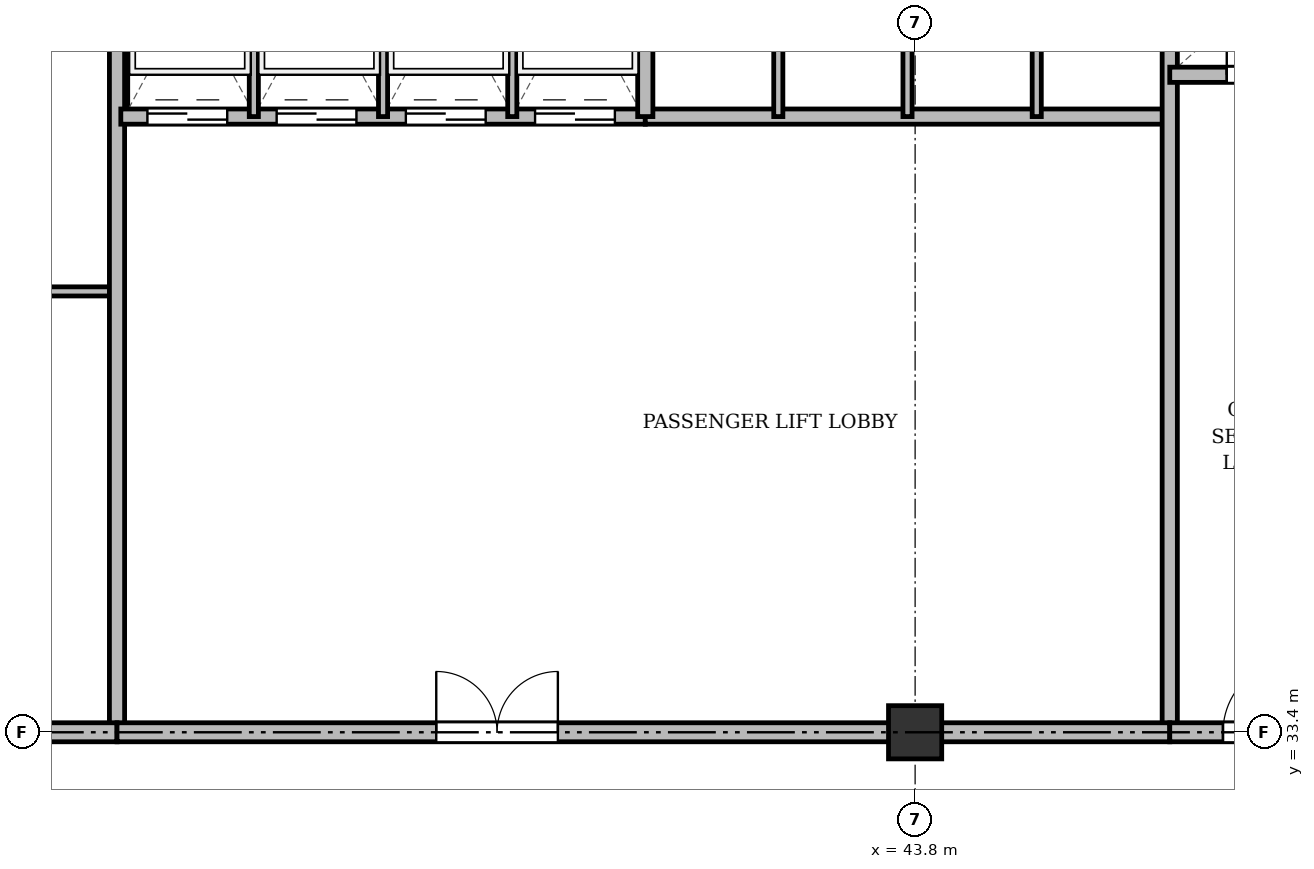
"""IFC4 building model, lengths in metres.
Left out: names, types, materials, properties, quantities, classifications, styles, units other than length and angle.
Written with IfcOpenShell. Run it as: python <this file> out.ifc"""

import sys

from ifc_helpers import new_model, si_unit, direction, frame, frame_2d, origin, origin_2d, place, context, subcontext, project, spatial, rectangle, extrude, source, transform, mapped, element, fill, save


model = new_model("IFC4")
c1 = context("Model", 3, precision=1e-05, world=origin(), true_north=direction((0.0, 1.0)))
c2 = subcontext(c1, "Body", "Model", "MODEL_VIEW")
j1 = project(units=[si_unit("LENGTHUNIT", "METRE"), si_unit("PLANEANGLEUNIT", "RADIAN")], contexts=[c1])
p1 = place(None, origin())
s1 = spatial("IfcSite", under=j1, at=p1, CompositionType="ELEMENT")
p2 = place(p1, origin())
s2 = spatial("IfcBuilding", under=s1, at=p2, CompositionType="ELEMENT")
p3 = place(p2, frame((0.0, 0.0, 182.5)))
s3 = spatial("IfcBuildingStorey", under=s2, at=p3, CompositionType="ELEMENT", Elevation=182.5)
m1 = source(origin(), c2, "Body", "SweptSolid", [
    extrude(rectangle(XDim=0.7, YDim=0.7, at=origin_2d()), origin(), (0.0, 0.0, 1.0), 8.0),
])
p4 = place(p3, frame((43.8, 33.4, 0.0), z_axis=(0.0, 0.0, 1.0), x_axis=(1.0, 0.0, 0.0)))
e1 = element("IfcColumn", 1, at=p4, inside=s3, PredefinedType="COLUMN", context=c2, shape_type="MappedRepresentation", body=[
    mapped(m1, transform((0.0, 0.0, 0.0), x_axis=(1.0, 0.0, 0.0), y_axis=(0.0, 1.0, 0.0), z_axis=(0.0, 0.0, 1.0), scale=1.0)),
])
p5 = place(p3, frame((26.3, 39.2, 0.0), z_axis=(0.0, 0.0, 1.0), x_axis=(1.0, 0.0, 0.0)))
e2 = element("IfcWall", 2, at=p5, inside=s3, PredefinedType="PARTITIONING", context=c2, shape_type="SweptSolid", body=[
    extrude(rectangle(XDim=7.0, YDim=0.12, at=frame_2d((3.5, 0.0))), origin(), (0.0, 0.0, 1.0), 7.12),
])
p6 = place(p5, frame((2.6, 0.0, 0.0)))
e3 = element("IfcOpeningElement", 3, at=p6, cuts=e2, PredefinedType="OPENING", context=c2, shape_type="SweptSolid", body=[
    extrude(rectangle(XDim=0.95, YDim=2.15, at=frame_2d((0.475, 1.075))), frame((0.0, 0.07, 0.0), z_axis=(0.0, -1.0, 0.0), x_axis=(1.0, 0.0, 0.0)), (0.0, 0.0, 1.0), 0.14),
])
p7 = place(p3, frame((33.3, 33.4, 0.0), z_axis=(0.0, 0.0, 1.0), x_axis=(0.0, 1.0, 0.0)))
e4 = element("IfcWall", 4, at=p7, inside=s3, PredefinedType="SOLIDWALL", context=c2, shape_type="SweptSolid", body=[
    extrude(rectangle(XDim=11.3, YDim=0.2, at=frame_2d((5.65, 0.0))), origin(), (0.0, 0.0, 1.0), 7.02),
])
p8 = place(p3, frame((33.35, 41.5, 0.0), z_axis=(0.0, 0.0, 1.0), x_axis=(1.0, 0.0, 0.0)))
e5 = element("IfcWall", 5, at=p8, inside=s3, PredefinedType="SOLIDWALL", context=c2, shape_type="SweptSolid", body=[
    extrude(rectangle(XDim=6.9, YDim=0.2, at=frame_2d((3.45, 0.0))), origin(), (0.0, 0.0, 1.0), 7.62),
])
p9 = place(p8, frame((0.35, 0.0, 0.0)))
e6 = element("IfcOpeningElement", 6, at=p9, cuts=e5, PredefinedType="OPENING", context=c2, shape_type="SweptSolid", body=[
    extrude(rectangle(XDim=1.05, YDim=2.15, at=frame_2d((0.525, 1.075))), frame((0.0, 0.11, 0.0), z_axis=(0.0, -1.0, 0.0), x_axis=(1.0, 0.0, 0.0)), (0.0, 0.0, 1.0), 0.22),
])
p10 = place(p8, frame((2.05, 0.0, 0.0)))
e7 = element("IfcOpeningElement", 7, at=p10, cuts=e5, PredefinedType="OPENING", context=c2, shape_type="SweptSolid", body=[
    extrude(rectangle(XDim=1.05, YDim=2.15, at=frame_2d((0.525, 1.075))), frame((0.0, 0.11, 0.0), z_axis=(0.0, -1.0, 0.0), x_axis=(1.0, 0.0, 0.0)), (0.0, 0.0, 1.0), 0.22),
])
p11 = place(p8, frame((3.75, 0.0, 0.0)))
e8 = element("IfcOpeningElement", 8, at=p11, cuts=e5, PredefinedType="OPENING", context=c2, shape_type="SweptSolid", body=[
    extrude(rectangle(XDim=1.05, YDim=2.15, at=frame_2d((0.525, 1.075))), frame((0.0, 0.11, 0.0), z_axis=(0.0, -1.0, 0.0), x_axis=(1.0, 0.0, 0.0)), (0.0, 0.0, 1.0), 0.22),
])
p12 = place(p8, frame((5.45, 0.0, 0.0)))
e9 = element("IfcOpeningElement", 9, at=p12, cuts=e5, PredefinedType="OPENING", context=c2, shape_type="SweptSolid", body=[
    extrude(rectangle(XDim=1.05, YDim=2.15, at=frame_2d((0.525, 1.075))), frame((0.0, 0.11, 0.0), z_axis=(0.0, -1.0, 0.0), x_axis=(1.0, 0.0, 0.0)), (0.0, 0.0, 1.0), 0.22),
])
for number, where, z_axis, x_axis in (
    (10, (35.1, 41.5, 0.0), (0.0, 0.0, 1.0), (0.0, 1.0, 0.0)),
    (11, (36.8, 41.5, 0.0), (0.0, 0.0, 1.0), (0.0, 1.0, 0.0)),
    (12, (38.5, 41.5, 0.0), (0.0, 0.0, 1.0), (0.0, 1.0, 0.0)),
):
    element("IfcWall", number, at=place(p3, frame(where, z_axis=z_axis, x_axis=x_axis)), inside=s3, PredefinedType="PARTITIONING", context=c2, shape_type="SweptSolid", body=[
        extrude(rectangle(XDim=3.2, YDim=0.12, at=frame_2d((1.6, 0.0))), origin(), (0.0, 0.0, 1.0), 7.62),
    ])
p13 = place(p3, frame((40.25, 41.5, 0.0), z_axis=(0.0, 0.0, 1.0), x_axis=(1.0, 0.0, 0.0)))
e13 = element("IfcWall", 13, at=p13, inside=s3, PredefinedType="SOLIDWALL", context=c2, shape_type="SweptSolid", body=[
    extrude(rectangle(XDim=6.9, YDim=0.2, at=frame_2d((3.45, 0.0))), origin(), (0.0, 0.0, 1.0), 7.12),
])
p14 = place(p3, frame((40.25, 41.5, 0.0), z_axis=(0.0, 0.0, 1.0), x_axis=(0.0, 1.0, 0.0)))
e14 = element("IfcWall", 14, at=p14, inside=s3, PredefinedType="SOLIDWALL", context=c2, shape_type="SweptSolid", body=[
    extrude(rectangle(XDim=3.2, YDim=0.2, at=frame_2d((1.6, 0.0))), origin(), (0.0, 0.0, 1.0), 7.62),
])
p15 = place(p3, frame((42.0, 41.5, 0.0), z_axis=(0.0, 0.0, 1.0), x_axis=(0.0, 1.0, 0.0)))
e15 = element("IfcWall", 15, at=p15, inside=s3, PredefinedType="PARTITIONING", context=c2, shape_type="SweptSolid", body=[
    extrude(rectangle(XDim=3.2, YDim=0.12, at=frame_2d((1.6, 0.0))), origin(), (0.0, 0.0, 1.0), 7.62),
])
p16 = place(p3, frame((43.7, 41.5, 0.0), z_axis=(0.0, 0.0, 1.0), x_axis=(0.0, 1.0, 0.0)))
e16 = element("IfcWall", 16, at=p16, inside=s3, PredefinedType="PARTITIONING", context=c2, shape_type="SweptSolid", body=[
    extrude(rectangle(XDim=3.2, YDim=0.12, at=frame_2d((1.6, 0.0))), origin(), (0.0, 0.0, 1.0), 7.12),
])
p17 = place(p3, frame((45.4, 41.5, 0.0), z_axis=(0.0, 0.0, 1.0), x_axis=(0.0, 1.0, 0.0)))
e17 = element("IfcWall", 17, at=p17, inside=s3, PredefinedType="PARTITIONING", context=c2, shape_type="SweptSolid", body=[
    extrude(rectangle(XDim=3.2, YDim=0.12, at=frame_2d((1.6, 0.0))), origin(), (0.0, 0.0, 1.0), 7.62),
])
p18 = place(p3, frame((47.15, 33.4, 0.0), z_axis=(0.0, 0.0, 1.0), x_axis=(0.0, 1.0, 0.0)))
e18 = element("IfcWall", 18, at=p18, inside=s3, PredefinedType="SOLIDWALL", context=c2, shape_type="SweptSolid", body=[
    extrude(rectangle(XDim=11.3, YDim=0.2, at=frame_2d((5.65, 0.0))), origin(), (0.0, 0.0, 1.0), 7.02),
])
p19 = place(p3, frame((26.3, 33.4, 0.0), z_axis=(0.0, 0.0, 1.0), x_axis=(1.0, 0.0, 0.0)))
e19 = element("IfcWall", 19, at=p19, inside=s3, PredefinedType="PARTITIONING", context=c2, shape_type="SweptSolid", body=[
    extrude(rectangle(XDim=7.0, YDim=0.25, at=frame_2d((3.5, 0.0))), origin(), (0.0, 0.0, 1.0), 7.02),
])
p20 = place(p19, frame((1.35, 0.0, 0.0)))
e20 = element("IfcOpeningElement", 20, at=p20, cuts=e19, PredefinedType="OPENING", context=c2, shape_type="SweptSolid", body=[
    extrude(rectangle(XDim=0.95, YDim=2.15, at=frame_2d((0.475, 1.075))), frame((0.0, 0.135, 0.0), z_axis=(0.0, -1.0, 0.0), x_axis=(1.0, 0.0, 0.0)), (0.0, 0.0, 1.0), 0.27),
])
p21 = place(p3, frame((33.3, 33.4, 0.0), z_axis=(0.0, 0.0, 1.0), x_axis=(1.0, 0.0, 0.0)))
e21 = element("IfcWall", 21, at=p21, inside=s3, PredefinedType="PARTITIONING", context=c2, shape_type="SweptSolid", body=[
    extrude(rectangle(XDim=13.85, YDim=0.25, at=frame_2d((6.925, 0.0))), origin(), (0.0, 0.0, 1.0), 7.02),
])
p22 = place(p21, frame((4.2, 0.0, 0.0)))
e22 = element("IfcOpeningElement", 22, at=p22, cuts=e21, PredefinedType="OPENING", context=c2, shape_type="SweptSolid", body=[
    extrude(rectangle(XDim=1.6, YDim=2.2, at=frame_2d((0.8, 1.1))), frame((0.0, 0.135, 0.0), z_axis=(0.0, -1.0, 0.0), x_axis=(1.0, 0.0, 0.0)), (0.0, 0.0, 1.0), 0.27),
])
p23 = place(p3, frame((47.15, 42.05, 0.0), z_axis=(0.0, 0.0, 1.0), x_axis=(1.0, 0.0, 0.0)))
e23 = element("IfcWall", 23, at=p23, inside=s3, PredefinedType="SOLIDWALL", context=c2, shape_type="SweptSolid", body=[
    extrude(rectangle(XDim=7.85, YDim=0.2, at=frame_2d((3.925, 0.0))), origin(), (0.0, 0.0, 1.0), 7.12),
])
p24 = place(p23, frame((0.75, 0.0, 0.0)))
e24 = element("IfcOpeningElement", 24, at=p24, cuts=e23, PredefinedType="OPENING", context=c2, shape_type="SweptSolid", body=[
    extrude(rectangle(XDim=0.9, YDim=2.1, at=frame_2d((0.45, 1.05))), frame((0.0, 0.11, 0.0), z_axis=(0.0, -1.0, 0.0), x_axis=(1.0, 0.0, 0.0)), (0.0, 0.0, 1.0), 0.22),
])
p25 = place(p23, frame((3.85, 0.0, 0.0)))
e25 = element("IfcOpeningElement", 25, at=p25, cuts=e23, PredefinedType="OPENING", context=c2, shape_type="SweptSolid", body=[
    extrude(rectangle(XDim=0.9, YDim=2.1, at=frame_2d((0.45, 1.05))), frame((0.0, 0.11, 0.0), z_axis=(0.0, -1.0, 0.0), x_axis=(1.0, 0.0, 0.0)), (0.0, 0.0, 1.0), 0.22),
])
p26 = place(p3, frame((47.15, 33.4, 0.0), z_axis=(0.0, 0.0, 1.0), x_axis=(1.0, 0.0, 0.0)))
e26 = element("IfcWall", 26, at=p26, inside=s3, PredefinedType="PARTITIONING", context=c2, shape_type="SweptSolid", body=[
    extrude(rectangle(XDim=11.15, YDim=0.25, at=frame_2d((5.575, 0.0))), origin(), (0.0, 0.0, 1.0), 7.02),
])
p27 = place(p26, frame((0.7, 0.0, 0.0)))
e27 = element("IfcOpeningElement", 27, at=p27, cuts=e26, PredefinedType="OPENING", context=c2, shape_type="SweptSolid", body=[
    extrude(rectangle(XDim=0.95, YDim=2.15, at=frame_2d((0.475, 1.075))), frame((0.0, 0.135, 0.0), z_axis=(0.0, -1.0, 0.0), x_axis=(1.0, 0.0, 0.0)), (0.0, 0.0, 1.0), 0.27),
])
p28 = place(p26, frame((6.0, 0.0, 0.0)))
e28 = element("IfcOpeningElement", 28, at=p28, cuts=e26, PredefinedType="OPENING", context=c2, shape_type="SweptSolid", body=[
    extrude(rectangle(XDim=1.2, YDim=2.15, at=frame_2d((0.6, 1.075))), frame((0.0, 0.135, 0.0), z_axis=(0.0, -1.0, 0.0), x_axis=(1.0, 0.0, 0.0)), (0.0, 0.0, 1.0), 0.27),
])
m2 = source(origin(), c2, "Body", "SweptSolid", [
    extrude(rectangle(XDim=1.05, YDim=2.15, at=frame_2d((0.525, 1.075))), frame((0.0, 0.025, 0.0), z_axis=(0.0, -1.0, 0.0), x_axis=(1.0, 0.0, 0.0)), (0.0, 0.0, 1.0), 0.05),
])
p29 = place(p9, origin())
e29 = element("IfcDoor", 29, at=p29, inside=s3, OperationType="DOUBLE_DOOR_SLIDING", PredefinedType="DOOR", context=c2, shape_type="MappedRepresentation", body=[
    mapped(m2, transform((0.0, 0.0, 0.0), x_axis=(1.0, 0.0, 0.0), y_axis=(0.0, 1.0, 0.0), z_axis=(0.0, 0.0, 1.0), scale=1.0)),
])
fill(e6, e29)
p30 = place(p10, origin())
e30 = element("IfcDoor", 30, at=p30, inside=s3, OperationType="DOUBLE_DOOR_SLIDING", PredefinedType="DOOR", context=c2, shape_type="MappedRepresentation", body=[
    mapped(m2, transform((0.0, 0.0, 0.0), x_axis=(1.0, 0.0, 0.0), y_axis=(0.0, 1.0, 0.0), z_axis=(0.0, 0.0, 1.0), scale=1.0)),
])
fill(e7, e30)
p31 = place(p11, origin())
e31 = element("IfcDoor", 31, at=p31, inside=s3, OperationType="DOUBLE_DOOR_SLIDING", PredefinedType="DOOR", context=c2, shape_type="MappedRepresentation", body=[
    mapped(m2, transform((0.0, 0.0, 0.0), x_axis=(1.0, 0.0, 0.0), y_axis=(0.0, 1.0, 0.0), z_axis=(0.0, 0.0, 1.0), scale=1.0)),
])
fill(e8, e31)
p32 = place(p12, origin())
e32 = element("IfcDoor", 32, at=p32, inside=s3, OperationType="DOUBLE_DOOR_SLIDING", PredefinedType="DOOR", context=c2, shape_type="MappedRepresentation", body=[
    mapped(m2, transform((0.0, 0.0, 0.0), x_axis=(1.0, 0.0, 0.0), y_axis=(0.0, 1.0, 0.0), z_axis=(0.0, 0.0, 1.0), scale=1.0)),
])
fill(e9, e32)
m3 = source(origin(), c2, "Body", "SweptSolid", [
    extrude(rectangle(XDim=1.6, YDim=2.2, at=frame_2d((0.8, 1.1))), frame((0.0, 0.025, 0.0), z_axis=(0.0, -1.0, 0.0), x_axis=(1.0, 0.0, 0.0)), (0.0, 0.0, 1.0), 0.05),
])
p33 = place(p22, origin())
e33 = element("IfcDoor", 33, at=p33, inside=s3, OperationType="DOUBLE_DOOR_SINGLE_SWING", PredefinedType="DOOR", context=c2, shape_type="MappedRepresentation", body=[
    mapped(m3, transform((0.0, 0.0, 0.0), x_axis=(1.0, 0.0, 0.0), y_axis=(0.0, 1.0, 0.0), z_axis=(0.0, 0.0, 1.0), scale=1.0)),
])
fill(e22, e33)
m4 = source(origin(), c2, "Body", "SweptSolid", [
    extrude(rectangle(XDim=0.9, YDim=2.1, at=frame_2d((0.45, 1.05))), frame((0.0, 0.025, 0.0), z_axis=(0.0, -1.0, 0.0), x_axis=(1.0, 0.0, 0.0)), (0.0, 0.0, 1.0), 0.05),
])
p34 = place(p24, origin())
e34 = element("IfcDoor", 34, at=p34, inside=s3, OperationType="SINGLE_SWING_LEFT", PredefinedType="DOOR", context=c2, shape_type="MappedRepresentation", body=[
    mapped(m4, transform((0.0, 0.0, 0.0), x_axis=(1.0, 0.0, 0.0), y_axis=(0.0, 1.0, 0.0), z_axis=(0.0, 0.0, 1.0), scale=1.0)),
])
fill(e24, e34)
m5 = source(origin(), c2, "Body", "SweptSolid", [
    extrude(rectangle(XDim=0.95, YDim=2.15, at=frame_2d((0.475, 1.075))), frame((0.0, 0.025, 0.0), z_axis=(0.0, -1.0, 0.0), x_axis=(1.0, 0.0, 0.0)), (0.0, 0.0, 1.0), 0.05),
])
p35 = place(p27, origin())
e35 = element("IfcDoor", 35, at=p35, inside=s3, OperationType="SINGLE_SWING_RIGHT", PredefinedType="DOOR", context=c2, shape_type="MappedRepresentation", body=[
    mapped(m5, transform((0.0, 0.0, 0.0), x_axis=(1.0, 0.0, 0.0), y_axis=(0.0, 1.0, 0.0), z_axis=(0.0, 0.0, 1.0), scale=1.0)),
])
fill(e27, e35)
save(model, sys.argv[1])
